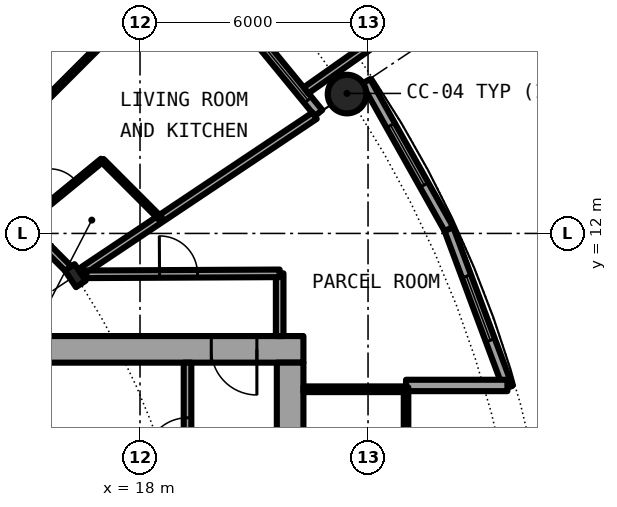
"""IFC4 building model, lengths in metres.
Left out: names, types, materials, properties, quantities, classifications, styles, units other than length and angle.
Written with IfcOpenShell. Run it as: python <this file> out.ifc"""

import sys

from ifc_helpers import new_model, si_unit, direction, frame, frame_2d, origin, origin_2d, place, context, subcontext, project, spatial, rectangle, hollow_circle, i_section, extrude, element, fill, save


model = new_model("IFC4")
c1 = context("Model", 3, precision=1e-05, world=origin(), true_north=direction((0.0, 1.0)))
c2 = subcontext(c1, "Body", "Model", "MODEL_VIEW")
j1 = project(units=[si_unit("LENGTHUNIT", "METRE"), si_unit("PLANEANGLEUNIT", "RADIAN")], contexts=[c1])
p1 = place(None, origin())
s1 = spatial("IfcSite", under=j1, at=p1, CompositionType="ELEMENT")
p2 = place(p1, origin())
s2 = spatial("IfcBuilding", under=s1, at=p2, CompositionType="ELEMENT")
p3 = place(p2, frame((0.0, 0.0, 91.05)))
s3 = spatial("IfcBuildingStorey", under=s2, at=p3, CompositionType="ELEMENT", Elevation=91.05)
p4 = place(p3, frame((23.448, 15.667, 0.0), z_axis=(0.0, 0.0, 1.0), x_axis=(1.0, 0.0, 0.0)))
e1 = element("IfcColumn", 1, at=p4, inside=s3, PredefinedType="COLUMN", context=c2, shape_type="SweptSolid", body=[
    extrude(hollow_circle(Radius=0.508, WallThickness=0.04, at=origin_2d()), origin(), (0.0, 0.0, 1.0), 3.05),
])
p5 = place(p3, frame((16.297, 10.889, 0.0), z_axis=(0.0, 0.0, 1.0), x_axis=(0.831469612303, 0.55557023302, 0.0)))
e2 = element("IfcColumn", 2, at=p5, inside=s3, PredefinedType="COLUMN", context=c2, shape_type="SweptSolid", body=[
    extrude(i_section(OverallWidth=0.306, OverallDepth=0.524, WebThickness=0.021, FlangeThickness=0.04, FilletRadius=0.027, at=origin_2d()), origin(), (0.0, 0.0, 1.0), 3.05),
])
p6 = place(p3, frame((22.699, 15.167, 0.0), z_axis=(0.0, 0.0, 1.0), x_axis=(-0.634382322723, 0.773019449054, 0.0)))
e3 = element("IfcWall", 3, at=p6, inside=s3, PredefinedType="SOLIDWALL", context=c2, shape_type="SweptSolid", body=[
    extrude(rectangle(XDim=5.352, YDim=0.25, at=frame_2d((2.676, 0.0))), origin(), (0.0, 0.0, 1.0), 2.7),
])
p7 = place(p6, frame((0.441, 0.0, 0.3)))
e4 = element("IfcOpeningElement", 4, at=p7, cuts=e3, PredefinedType="OPENING", context=c2, shape_type="SweptSolid", body=[
    extrude(rectangle(XDim=1.8, YDim=2.1, at=frame_2d((0.9, 1.05))), frame((0.0, 0.135, 0.0), z_axis=(0.0, -1.0, 0.0), x_axis=(1.0, 0.0, 0.0)), (0.0, 0.0, 1.0), 0.27),
])
p8 = place(p6, frame((3.51, 0.0, 0.0)))
e5 = element("IfcOpeningElement", 5, at=p8, cuts=e3, PredefinedType="OPENING", context=c2, shape_type="SweptSolid", body=[
    extrude(rectangle(XDim=1.0, YDim=2.2, at=frame_2d((0.5, 1.1))), frame((0.0, 0.135, 0.0), z_axis=(0.0, -1.0, 0.0), x_axis=(1.0, 0.0, 0.0)), (0.0, 0.0, 1.0), 0.27),
])
p9 = place(p3, frame((22.37, 15.765, -0.03), z_axis=(0.0, 0.0, 1.0), x_axis=(0.817256123454, 0.576274612209, 0.0)))
e6 = element("IfcWall", 6, at=p9, inside=s3, PredefinedType="SOLIDWALL", context=c2, shape_type="SweptSolid", body=[
    extrude(rectangle(XDim=2.933, YDim=0.2, at=frame_2d((1.466, 0.0))), origin(), (0.0, 0.0, 1.0), 2.73),
])
p10 = place(p3, frame((27.682, 7.945, 0.0), z_axis=(0.0, 0.0, 1.0), x_axis=(-0.349247811493, 0.937030397675, 0.0)))
e7 = element("IfcWall", 7, at=p10, inside=s3, PredefinedType="SOLIDWALL", context=c2, shape_type="SweptSolid", body=[
    extrude(rectangle(XDim=4.452, YDim=0.25, at=frame_2d((2.226, 0.0))), origin(), (0.0, 0.0, 1.0), 2.7),
])
p11 = place(p10, frame((1.327, 0.0, 0.3)))
e8 = element("IfcOpeningElement", 8, at=p11, cuts=e7, PredefinedType="OPENING", context=c2, shape_type="SweptSolid", body=[
    extrude(rectangle(XDim=1.8, YDim=2.1, at=frame_2d((0.9, 1.05))), frame((0.0, 0.135, 0.0), z_axis=(0.0, -1.0, 0.0), x_axis=(1.0, 0.0, 0.0)), (0.0, 0.0, 1.0), 0.27),
])
p12 = place(p3, frame((26.127, 12.117, 0.0), z_axis=(0.0, 0.0, 1.0), x_axis=(-0.489696356642, 0.871893042919, 0.0)))
e9 = element("IfcWall", 9, at=p12, inside=s3, PredefinedType="SOLIDWALL", context=c2, shape_type="SweptSolid", body=[
    extrude(rectangle(XDim=4.454, YDim=0.25, at=frame_2d((2.227, 0.0))), origin(), (0.0, 0.0, 1.0), 2.7),
])
p13 = place(p12, frame((1.327, 0.0, 0.3)))
e10 = element("IfcOpeningElement", 10, at=p13, cuts=e9, PredefinedType="OPENING", context=c2, shape_type="SweptSolid", body=[
    extrude(rectangle(XDim=1.8, YDim=2.1, at=frame_2d((0.9, 1.05))), frame((0.0, 0.135, 0.0), z_axis=(0.0, -1.0, 0.0), x_axis=(1.0, 0.0, 0.0)), (0.0, 0.0, 1.0), 0.27),
])
p14 = place(p3, frame((25.0, 8.0, 0.0), z_axis=(0.0, 0.0, 1.0), x_axis=(1.0, 0.0, 0.0)))
e11 = element("IfcWall", 11, at=p14, inside=s3, PredefinedType="SOLIDWALL", context=c2, shape_type="SweptSolid", body=[
    extrude(rectangle(XDim=2.667, YDim=0.3, at=frame_2d((1.333, 0.0))), origin(), (0.0, 0.0, 1.0), 2.7),
])
p15 = place(p3, frame((22.3, 8.95, 0.0), z_axis=(0.0, 0.0, 1.0), x_axis=(-1.0, 0.0, 0.0)))
e12 = element("IfcWall", 12, at=p15, inside=s3, PredefinedType="SHEAR", context=c2, shape_type="SweptSolid", body=[
    extrude(rectangle(XDim=14.0, YDim=0.7, at=frame_2d((7.0, 0.0))), origin(), (0.0, 0.0, 1.0), 3.05),
])
p16 = place(p15, frame((1.225, 0.0, 0.0)))
e13 = element("IfcOpeningElement", 13, at=p16, cuts=e12, PredefinedType="OPENING", context=c2, shape_type="SweptSolid", body=[
    extrude(rectangle(XDim=1.2, YDim=2.3, at=frame_2d((0.6, 1.15))), frame((0.0, 0.36, 0.0), z_axis=(0.0, -1.0, 0.0), x_axis=(1.0, 0.0, 0.0)), (0.0, 0.0, 1.0), 0.72),
])
p17 = place(p3, frame((21.95, 8.6, 0.0), z_axis=(0.0, 0.0, 1.0), x_axis=(0.0, -1.0, 0.0)))
e14 = element("IfcWall", 14, at=p17, inside=s3, PredefinedType="SHEAR", context=c2, shape_type="SweptSolid", body=[
    extrude(rectangle(XDim=17.2, YDim=0.7, at=frame_2d((8.6, 0.0))), origin(), (0.0, 0.0, 1.0), 3.05),
])
p18 = place(p17, frame((7.7, 0.0, 0.0)))
e15 = element("IfcOpeningElement", 15, at=p18, cuts=e14, PredefinedType="OPENING", context=c2, shape_type="SweptSolid", body=[
    extrude(rectangle(XDim=1.8, YDim=2.3, at=frame_2d((0.9, 1.15))), frame((0.0, 0.36, 0.0), z_axis=(0.0, -1.0, 0.0), x_axis=(1.0, 0.0, 0.0)), (0.0, 0.0, 1.0), 0.72),
])
p19 = place(p3, frame((19.25, 1.575, 0.0), z_axis=(0.0, 0.0, 1.0), x_axis=(0.0, 1.0, 0.0)))
e16 = element("IfcWall", 16, at=p19, inside=s3, PredefinedType="SOLIDWALL", context=c2, shape_type="SweptSolid", body=[
    extrude(rectangle(XDim=7.025, YDim=0.2, at=frame_2d((3.513, 0.0))), origin(), (0.0, 0.0, 1.0), 2.7),
])
p20 = place(p19, frame((4.475, 0.0, 0.0)))
e17 = element("IfcOpeningElement", 17, at=p20, cuts=e16, PredefinedType="OPENING", context=c2, shape_type="SweptSolid", body=[
    extrude(rectangle(XDim=1.1, YDim=2.3, at=frame_2d((0.55, 1.15))), frame((0.0, 0.11, 0.0), z_axis=(0.0, -1.0, 0.0), x_axis=(1.0, 0.0, 0.0)), (0.0, 0.0, 1.0), 0.22),
])
p21 = place(p3, frame((22.3, 7.9, 0.0), z_axis=(0.0, 0.0, 1.0), x_axis=(1.0, 0.0, 0.0)))
e18 = element("IfcWall", 18, at=p21, inside=s3, PredefinedType="PARTITIONING", context=c2, shape_type="SweptSolid", body=[
    extrude(rectangle(XDim=2.64, YDim=0.15, at=frame_2d((1.32, 0.0))), origin(), (0.0, 0.0, 1.0), 2.7),
])
p22 = place(p3, frame((25.0, -7.95, 0.0), z_axis=(0.0, 0.0, 1.0), x_axis=(0.0, 1.0, 0.0)))
e19 = element("IfcWall", 19, at=p22, inside=s3, PredefinedType="PARTITIONING", context=c2, shape_type="SweptSolid", body=[
    extrude(rectangle(XDim=15.9, YDim=0.12, at=frame_2d((7.95, 0.0))), origin(), (0.0, 0.0, 1.0), 2.7),
])
p23 = place(p22, frame((0.95, 0.0, 0.1)))
e20 = element("IfcOpeningElement", 20, at=p23, cuts=e19, PredefinedType="OPENING", context=c2, shape_type="SweptSolid", body=[
    extrude(rectangle(XDim=14.0, YDim=2.35, at=frame_2d((7.0, 1.175))), frame((0.0, 0.07, 0.0), z_axis=(0.0, -1.0, 0.0), x_axis=(1.0, 0.0, 0.0)), (0.0, 0.0, 1.0), 0.14),
])
p24 = place(p3, frame((21.675, 9.3, 0.0), z_axis=(0.0, 0.0, 1.0), x_axis=(0.0, 1.0, 0.0)))
e21 = element("IfcWall", 21, at=p24, inside=s3, PredefinedType="PARTITIONING", context=c2, shape_type="SweptSolid", body=[
    extrude(rectangle(XDim=1.65, YDim=0.2, at=frame_2d((0.825, 0.0))), origin(), (0.0, 0.0, 1.0), 2.7),
])
p25 = place(p3, frame((14.945, 12.241, 0.0), z_axis=(0.0, 0.0, 1.0), x_axis=(0.77367517848, 0.633582447834, 0.0)))
e22 = element("IfcWall", 22, at=p25, inside=s3, PredefinedType="PARTITIONING", context=c2, shape_type="SweptSolid", body=[
    extrude(rectangle(XDim=2.661, YDim=0.1, at=frame_2d((1.331, 0.0))), origin(), (0.0, 0.0, 1.0), 2.7),
])
p26 = place(p25, frame((0.881, 0.0, 0.0)))
e23 = element("IfcOpeningElement", 23, at=p26, cuts=e22, PredefinedType="OPENING", context=c2, shape_type="SweptSolid", body=[
    extrude(rectangle(XDim=0.9, YDim=2.3, at=frame_2d((0.45, 1.15))), frame((0.0, 0.06, 0.0), z_axis=(0.0, -1.0, 0.0), x_axis=(1.0, 0.0, 0.0)), (0.0, 0.0, 1.0), 0.12),
])
p27 = place(p3, frame((15.465, 15.465, 0.0), z_axis=(0.0, 0.0, 1.0), x_axis=(0.707106781187, 0.707106781187, 0.0)))
e24 = element("IfcWall", 24, at=p27, inside=s3, PredefinedType="PARTITIONING", context=c2, shape_type="SweptSolid", body=[
    extrude(rectangle(XDim=5.305, YDim=0.1, at=frame_2d((2.652, 0.0))), origin(), (0.0, 0.0, 1.0), 2.7),
])
p28 = place(p27, frame((2.202, 0.0, 0.0)))
e25 = element("IfcOpeningElement", 25, at=p28, cuts=e24, PredefinedType="OPENING", context=c2, shape_type="SweptSolid", body=[
    extrude(rectangle(XDim=0.9, YDim=2.3, at=frame_2d((0.45, 1.15))), frame((0.0, 0.06, 0.0), z_axis=(0.0, -1.0, 0.0), x_axis=(1.0, 0.0, 0.0)), (0.0, 0.0, 1.0), 0.12),
])
p29 = place(p3, frame((16.515, 11.034, 0.0), z_axis=(0.0, 0.0, 1.0), x_axis=(0.831382022135, 0.555701298605, 0.0)))
e26 = element("IfcWall", 26, at=p29, inside=s3, PredefinedType="PARTITIONING", context=c2, shape_type="SweptSolid", body=[
    extrude(rectangle(XDim=7.313, YDim=0.2, at=frame_2d((3.657, 0.0))), origin(), (0.0, 0.0, 1.0), 2.7),
])
p30 = place(p3, frame((16.588, 10.925, 0.0), z_axis=(0.0, 0.0, 1.0), x_axis=(0.999988019025, 0.004895079807, 0.0)))
e27 = element("IfcWall", 27, at=p30, inside=s3, PredefinedType="PARTITIONING", context=c2, shape_type="SweptSolid", body=[
    extrude(rectangle(XDim=5.087, YDim=0.2, at=frame_2d((2.543, 0.0))), origin(), (0.0, 0.0, 1.0), 2.7),
])
p31 = place(p30, frame((1.925, 0.0, 0.0)))
e28 = element("IfcOpeningElement", 28, at=p31, cuts=e27, PredefinedType="OPENING", context=c2, shape_type="SweptSolid", body=[
    extrude(rectangle(XDim=1.0, YDim=2.3, at=frame_2d((0.5, 1.15))), frame((0.0, 0.11, 0.0), z_axis=(0.0, -1.0, 0.0), x_axis=(1.0, 0.0, 0.0)), (0.0, 0.0, 1.0), 0.22),
])
p32 = place(p3, frame((11.0, 16.186, 0.0), z_axis=(0.0, 0.0, 1.0), x_axis=(0.707106781187, -0.707106781187, 0.0)))
e29 = element("IfcWall", 29, at=p32, inside=s3, PredefinedType="PARTITIONING", context=c2, shape_type="SweptSolid", body=[
    extrude(rectangle(XDim=7.334, YDim=0.2, at=frame_2d((3.667, 0.0))), origin(), (0.0, 0.0, 1.0), 2.38),
])
p33 = place(p32, frame((2.211, 0.0, 0.0)))
e30 = element("IfcOpeningElement", 30, at=p33, cuts=e29, PredefinedType="OPENING", context=c2, shape_type="SweptSolid", body=[
    extrude(rectangle(XDim=1.0, YDim=2.3, at=frame_2d((0.5, 1.15))), frame((0.0, 0.11, 0.0), z_axis=(0.0, -1.0, 0.0), x_axis=(1.0, 0.0, 0.0)), (0.0, 0.0, 1.0), 0.22),
])
p34 = place(p3, frame((17.006, 13.924, 0.0), z_axis=(0.0, 0.0, 1.0), x_axis=(0.706826194425, -0.707387256653, 0.0)))
e31 = element("IfcWall", 31, at=p34, inside=s3, PredefinedType="PARTITIONING", context=c2, shape_type="SweptSolid", body=[
    extrude(rectangle(XDim=2.176, YDim=0.1, at=frame_2d((1.088, 0.0))), origin(), (0.0, 0.0, 1.0), 2.7),
])
p35 = place(p7, origin())
e32 = element("IfcWindow", 32, at=p35, inside=s3, PartitioningType="SINGLE_PANEL", PredefinedType="WINDOW", context=c2, shape_type="SweptSolid", body=[
    extrude(rectangle(XDim=1.8, YDim=2.1, at=frame_2d((0.9, 1.05))), frame((0.0, 0.03, 0.0), z_axis=(0.0, -1.0, 0.0), x_axis=(1.0, 0.0, 0.0)), (0.0, 0.0, 1.0), 0.06),
])
fill(e4, e32)
p36 = place(p11, origin())
e33 = element("IfcWindow", 33, at=p36, inside=s3, PartitioningType="SINGLE_PANEL", PredefinedType="WINDOW", context=c2, shape_type="SweptSolid", body=[
    extrude(rectangle(XDim=1.8, YDim=2.1, at=frame_2d((0.9, 1.05))), frame((0.0, 0.03, 0.0), z_axis=(0.0, -1.0, 0.0), x_axis=(1.0, 0.0, 0.0)), (0.0, 0.0, 1.0), 0.06),
])
fill(e8, e33)
p37 = place(p13, origin())
e34 = element("IfcWindow", 34, at=p37, inside=s3, PartitioningType="SINGLE_PANEL", PredefinedType="WINDOW", context=c2, shape_type="SweptSolid", body=[
    extrude(rectangle(XDim=1.8, YDim=2.1, at=frame_2d((0.9, 1.05))), frame((0.0, 0.03, 0.0), z_axis=(0.0, -1.0, 0.0), x_axis=(1.0, 0.0, 0.0)), (0.0, 0.0, 1.0), 0.06),
])
fill(e10, e34)
p38 = place(p20, origin())
e35 = element("IfcDoor", 35, at=p38, inside=s3, OperationType="SINGLE_SWING_LEFT", PredefinedType="DOOR", context=c2, shape_type="SweptSolid", body=[
    extrude(rectangle(XDim=1.1, YDim=2.3, at=frame_2d((0.55, 1.15))), frame((0.0, 0.025, 0.0), z_axis=(0.0, -1.0, 0.0), x_axis=(1.0, 0.0, 0.0)), (0.0, 0.0, 1.0), 0.05),
])
fill(e17, e35)
p39 = place(p16, origin())
e36 = element("IfcDoor", 36, at=p39, inside=s3, OperationType="SINGLE_SWING_RIGHT", PredefinedType="DOOR", context=c2, shape_type="SweptSolid", body=[
    extrude(rectangle(XDim=1.2, YDim=2.3, at=frame_2d((0.6, 1.15))), frame((0.0, 0.025, 0.0), z_axis=(0.0, -1.0, 0.0), x_axis=(1.0, 0.0, 0.0)), (0.0, 0.0, 1.0), 0.05),
])
fill(e13, e36)
p40 = place(p23, origin())
e37 = element("IfcWindow", 37, at=p40, inside=s3, PartitioningType="SINGLE_PANEL", PredefinedType="WINDOW", context=c2, shape_type="SweptSolid", body=[
    extrude(rectangle(XDim=14.0, YDim=2.35, at=frame_2d((7.0, 1.175))), frame((0.0, 0.03, 0.0), z_axis=(0.0, -1.0, 0.0), x_axis=(1.0, 0.0, 0.0)), (0.0, 0.0, 1.0), 0.06),
])
fill(e20, e37)
p41 = place(p26, origin())
e38 = element("IfcDoor", 38, at=p41, inside=s3, OperationType="SINGLE_SWING_LEFT", PredefinedType="DOOR", context=c2, shape_type="SweptSolid", body=[
    extrude(rectangle(XDim=0.9, YDim=2.3, at=frame_2d((0.45, 1.15))), frame((0.0, 0.025, 0.0), z_axis=(0.0, -1.0, 0.0), x_axis=(1.0, 0.0, 0.0)), (0.0, 0.0, 1.0), 0.05),
])
fill(e23, e38)
p42 = place(p31, origin())
e39 = element("IfcDoor", 39, at=p42, inside=s3, OperationType="SINGLE_SWING_LEFT", PredefinedType="DOOR", context=c2, shape_type="SweptSolid", body=[
    extrude(rectangle(XDim=1.0, YDim=2.3, at=frame_2d((0.5, 1.15))), frame((0.0, 0.025, 0.0), z_axis=(0.0, -1.0, 0.0), x_axis=(1.0, 0.0, 0.0)), (0.0, 0.0, 1.0), 0.05),
])
fill(e28, e39)
save(model, sys.argv[1])
